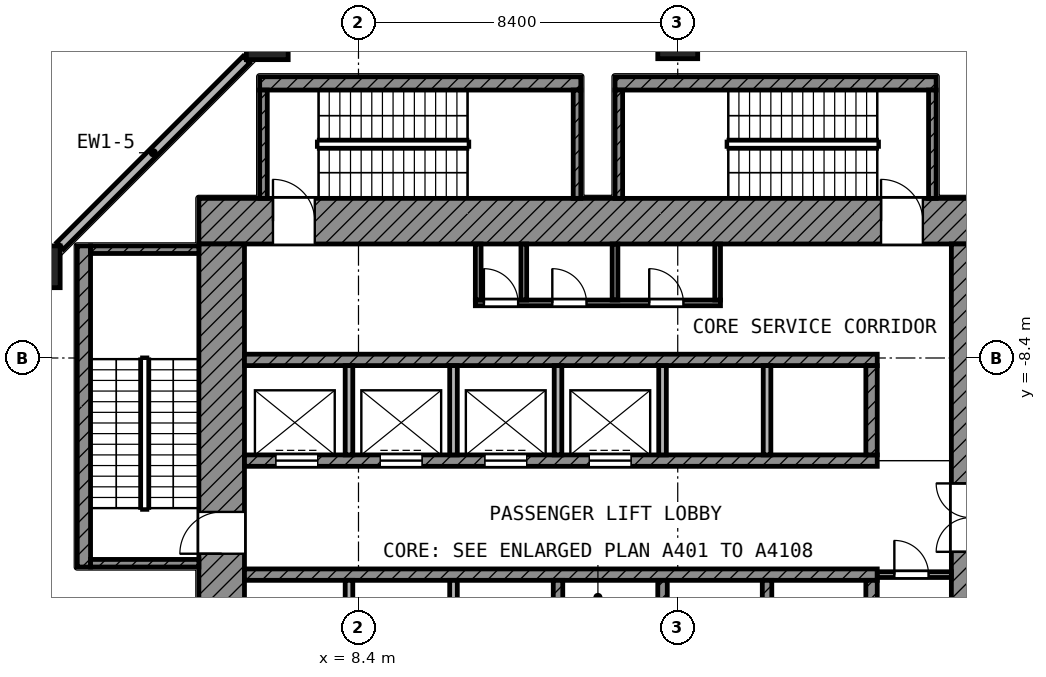
"""IFC4 building model, lengths in metres.
Left out: names, types, materials, properties, quantities, classifications, styles, units other than length and angle.
Written with IfcOpenShell. Run it as: python <this file> out.ifc"""

import sys

from ifc_helpers import new_model, si_unit, direction, frame, frame_2d, origin, origin_2d, place, context, subcontext, project, spatial, rectangle, extrude, element, fill, save


model = new_model("IFC4")
c1 = context("Model", 3, precision=1e-05, world=origin(), true_north=direction((0.0, 1.0)))
c2 = subcontext(c1, "Body", "Model", "MODEL_VIEW")
j1 = project(units=[si_unit("LENGTHUNIT", "METRE"), si_unit("PLANEANGLEUNIT", "RADIAN")], contexts=[c1])
p1 = place(None, origin())
s1 = spatial("IfcSite", under=j1, at=p1, CompositionType="ELEMENT")
p2 = place(p1, origin())
s2 = spatial("IfcBuilding", under=s1, at=p2, CompositionType="ELEMENT")
p3 = place(p2, frame((0.0, 0.0, 93.8)))
s3 = spatial("IfcBuildingStorey", under=s2, at=p3, CompositionType="ELEMENT", Elevation=93.8)
p4 = place(p3, frame((6.0, 0.0, 0.0), z_axis=(0.0, 0.0, 1.0), x_axis=(1.0, 0.0, 0.0)))
e1 = element("IfcColumn", 1, at=p4, inside=s3, PredefinedType="COLUMN", context=c2, shape_type="SweptSolid", body=[
    extrude(rectangle(XDim=1.1, YDim=1.1, at=origin_2d()), origin(), (0.0, 0.0, 1.0), 5.0),
])
p5 = place(p3, frame((16.8, 0.0, 0.0), z_axis=(0.0, 0.0, 1.0), x_axis=(1.0, 0.0, 0.0)))
e2 = element("IfcColumn", 2, at=p5, inside=s3, PredefinedType="COLUMN", context=c2, shape_type="SweptSolid", body=[
    extrude(rectangle(XDim=1.05, YDim=1.05, at=origin_2d()), origin(), (0.0, 0.0, 1.0), 5.0),
])
p6 = place(p3, frame((0.0, -6.0, 0.0), z_axis=(0.0, 0.0, 1.0), x_axis=(1.0, 0.0, 0.0)))
e3 = element("IfcColumn", 3, at=p6, inside=s3, PredefinedType="COLUMN", context=c2, shape_type="SweptSolid", body=[
    extrude(rectangle(XDim=1.1, YDim=1.1, at=origin_2d()), origin(), (0.0, 0.0, 1.0), 5.0),
])
p7 = place(p3, frame((5.45, -0.55, 0.0), z_axis=(0.0, 0.0, 1.0), x_axis=(-0.707106781187, -0.707106781187, 0.0)))
e4 = element("IfcWall", 4, at=p7, inside=s3, PredefinedType="SOLIDWALL", context=c2, shape_type="SweptSolid", body=[
    extrude(rectangle(XDim=6.929, YDim=0.25, at=frame_2d((3.465, 0.0))), origin(), (0.0, 0.0, 1.0), 3.0),
])
p8 = place(p3, frame((4.2, -4.8, 0.0), z_axis=(0.0, 0.0, 1.0), x_axis=(1.0, 0.0, 0.0)))
e5 = element("IfcWall", 5, at=p8, inside=s3, PredefinedType="SHEAR", context=c2, shape_type="SweptSolid", body=[
    extrude(rectangle(XDim=20.8, YDim=1.2, at=frame_2d((10.4, 0.0))), origin(), (0.0, 0.0, 1.0), 4.4),
])
p9 = place(p8, frame((1.95, 0.0, 0.0)))
e6 = element("IfcOpeningElement", 6, at=p9, cuts=e5, PredefinedType="OPENING", context=c2, shape_type="SweptSolid", body=[
    extrude(rectangle(XDim=1.1, YDim=2.1, at=frame_2d((0.55, 1.05))), frame((0.0, 0.61, 0.0), z_axis=(0.0, -1.0, 0.0), x_axis=(1.0, 0.0, 0.0)), (0.0, 0.0, 1.0), 1.22),
])
p10 = place(p8, frame((17.95, 0.0, 0.0)))
e7 = element("IfcOpeningElement", 7, at=p10, cuts=e5, PredefinedType="OPENING", context=c2, shape_type="SweptSolid", body=[
    extrude(rectangle(XDim=1.1, YDim=2.1, at=frame_2d((0.55, 1.05))), frame((0.0, 0.61, 0.0), z_axis=(0.0, -1.0, 0.0), x_axis=(1.0, 0.0, 0.0)), (0.0, 0.0, 1.0), 1.22),
])
p11 = place(p3, frame((4.8, -25.0, 0.0), z_axis=(0.0, 0.0, 1.0), x_axis=(0.0, 1.0, 0.0)))
e8 = element("IfcWall", 8, at=p11, inside=s3, PredefinedType="SHEAR", context=c2, shape_type="SweptSolid", body=[
    extrude(rectangle(XDim=19.6, YDim=1.2, at=frame_2d((9.8, 0.0))), origin(), (0.0, 0.0, 1.0), 4.4),
])
p12 = place(p11, frame((11.45, 0.0, 0.0)))
e9 = element("IfcOpeningElement", 9, at=p12, cuts=e8, PredefinedType="OPENING", context=c2, shape_type="SweptSolid", body=[
    extrude(rectangle(XDim=1.1, YDim=2.1, at=frame_2d((0.55, 1.05))), frame((0.0, 0.61, 0.0), z_axis=(0.0, -1.0, 0.0), x_axis=(1.0, 0.0, 0.0)), (0.0, 0.0, 1.0), 1.22),
])
p13 = place(p11, frame((2.15, 0.0, 0.0)))
e10 = element("IfcOpeningElement", 10, at=p13, cuts=e8, PredefinedType="OPENING", context=c2, shape_type="SweptSolid", body=[
    extrude(rectangle(XDim=1.1, YDim=2.1, at=frame_2d((0.55, 1.05))), frame((0.0, 0.61, 0.0), z_axis=(0.0, -1.0, 0.0), x_axis=(1.0, 0.0, 0.0)), (0.0, 0.0, 1.0), 1.22),
])
p14 = place(p3, frame((24.5, -24.0, 0.0), z_axis=(0.0, 0.0, 1.0), x_axis=(0.0, 1.0, 0.0)))
e11 = element("IfcWall", 11, at=p14, inside=s3, PredefinedType="SHEAR", context=c2, shape_type="SweptSolid", body=[
    extrude(rectangle(XDim=18.6, YDim=1.0, at=frame_2d((9.3, 0.0))), origin(), (0.0, 0.0, 1.0), 4.4),
])
p15 = place(p14, frame((10.5, 0.0, 0.0)))
e12 = element("IfcOpeningElement", 12, at=p15, cuts=e11, PredefinedType="OPENING", context=c2, shape_type="SweptSolid", body=[
    extrude(rectangle(XDim=1.8, YDim=2.1, at=frame_2d((0.9, 1.05))), frame((0.0, 0.51, 0.0), z_axis=(0.0, -1.0, 0.0), x_axis=(1.0, 0.0, 0.0)), (0.0, 0.0, 1.0), 1.02),
])
p16 = place(p3, frame((5.4, -8.45, 0.0), z_axis=(0.0, 0.0, 1.0), x_axis=(1.0, 0.0, 0.0)))
e13 = element("IfcWall", 13, at=p16, inside=s3, PredefinedType="SHEAR", context=c2, shape_type="SweptSolid", body=[
    extrude(rectangle(XDim=16.65, YDim=0.3, at=frame_2d((8.325, 0.0))), origin(), (0.0, 0.0, 1.0), 4.4),
])
p17 = place(p3, frame((5.4, -11.1, 0.0), z_axis=(0.0, 0.0, 1.0), x_axis=(1.0, 0.0, 0.0)))
e14 = element("IfcWall", 14, at=p17, inside=s3, PredefinedType="SHEAR", context=c2, shape_type="SweptSolid", body=[
    extrude(rectangle(XDim=16.65, YDim=0.3, at=frame_2d((8.325, 0.0))), origin(), (0.0, 0.0, 1.0), 4.4),
])
p18 = place(p17, frame((0.825, 0.0, 0.0)))
e15 = element("IfcOpeningElement", 15, at=p18, cuts=e14, PredefinedType="OPENING", context=c2, shape_type="SweptSolid", body=[
    extrude(rectangle(XDim=1.1, YDim=2.1, at=frame_2d((0.55, 1.05))), frame((0.0, 0.16, 0.0), z_axis=(0.0, -1.0, 0.0), x_axis=(1.0, 0.0, 0.0)), (0.0, 0.0, 1.0), 0.32),
])
p19 = place(p17, frame((3.575, 0.0, 0.0)))
e16 = element("IfcOpeningElement", 16, at=p19, cuts=e14, PredefinedType="OPENING", context=c2, shape_type="SweptSolid", body=[
    extrude(rectangle(XDim=1.1, YDim=2.1, at=frame_2d((0.55, 1.05))), frame((0.0, 0.16, 0.0), z_axis=(0.0, -1.0, 0.0), x_axis=(1.0, 0.0, 0.0)), (0.0, 0.0, 1.0), 0.32),
])
p20 = place(p17, frame((6.325, 0.0, 0.0)))
e17 = element("IfcOpeningElement", 17, at=p20, cuts=e14, PredefinedType="OPENING", context=c2, shape_type="SweptSolid", body=[
    extrude(rectangle(XDim=1.1, YDim=2.1, at=frame_2d((0.55, 1.05))), frame((0.0, 0.16, 0.0), z_axis=(0.0, -1.0, 0.0), x_axis=(1.0, 0.0, 0.0)), (0.0, 0.0, 1.0), 0.32),
])
p21 = place(p17, frame((9.075, 0.0, 0.0)))
e18 = element("IfcOpeningElement", 18, at=p21, cuts=e14, PredefinedType="OPENING", context=c2, shape_type="SweptSolid", body=[
    extrude(rectangle(XDim=1.1, YDim=2.1, at=frame_2d((0.55, 1.05))), frame((0.0, 0.16, 0.0), z_axis=(0.0, -1.0, 0.0), x_axis=(1.0, 0.0, 0.0)), (0.0, 0.0, 1.0), 0.32),
])
p22 = place(p3, frame((5.4, -14.1, 0.0), z_axis=(0.0, 0.0, 1.0), x_axis=(1.0, 0.0, 0.0)))
e19 = element("IfcWall", 19, at=p22, inside=s3, PredefinedType="SHEAR", context=c2, shape_type="SweptSolid", body=[
    extrude(rectangle(XDim=16.65, YDim=0.3, at=frame_2d((8.325, 0.0))), origin(), (0.0, 0.0, 1.0), 4.4),
])
p23 = place(p3, frame((21.9, -10.95, 0.0), z_axis=(0.0, 0.0, 1.0), x_axis=(0.0, 1.0, 0.0)))
e20 = element("IfcWall", 20, at=p23, inside=s3, PredefinedType="SHEAR", context=c2, shape_type="SweptSolid", body=[
    extrude(rectangle(XDim=2.35, YDim=0.3, at=frame_2d((1.175, 0.0))), origin(), (0.0, 0.0, 1.0), 4.4),
])
p24 = place(p3, frame((21.9, -16.6, 0.0), z_axis=(0.0, 0.0, 1.0), x_axis=(0.0, 1.0, 0.0)))
e21 = element("IfcWall", 21, at=p24, inside=s3, PredefinedType="SHEAR", context=c2, shape_type="SweptSolid", body=[
    extrude(rectangle(XDim=2.35, YDim=0.3, at=frame_2d((1.175, 0.0))), origin(), (0.0, 0.0, 1.0), 4.4),
])
for number, where, z_axis, x_axis in (
    (22, (8.15, -10.95, 0.0), (0.0, 0.0, 1.0), (0.0, 1.0, 0.0)),
    (23, (10.9, -10.95, 0.0), (0.0, 0.0, 1.0), (0.0, 1.0, 0.0)),
    (24, (13.65, -10.95, 0.0), (0.0, 0.0, 1.0), (0.0, 1.0, 0.0)),
    (25, (16.4, -10.95, 0.0), (0.0, 0.0, 1.0), (0.0, 1.0, 0.0)),
    (26, (19.15, -10.95, 0.0), (0.0, 0.0, 1.0), (0.0, 1.0, 0.0)),
):
    element("IfcWall", number, at=place(p3, frame(where, z_axis=z_axis, x_axis=x_axis)), inside=s3, PredefinedType="PARTITIONING", context=c2, shape_type="SweptSolid", body=[
        extrude(rectangle(XDim=2.35, YDim=0.2, at=frame_2d((1.175, 0.0))), origin(), (0.0, 0.0, 1.0), 4.4),
    ])
for number, where, z_axis, x_axis in (
    (27, (8.15, -16.6, 0.0), (0.0, 0.0, 1.0), (0.0, 1.0, 0.0)),
    (28, (10.9, -16.6, 0.0), (0.0, 0.0, 1.0), (0.0, 1.0, 0.0)),
):
    element("IfcWall", number, at=place(p3, frame(where, z_axis=z_axis, x_axis=x_axis)), inside=s3, PredefinedType="PARTITIONING", context=c2, shape_type="SweptSolid", body=[
        extrude(rectangle(XDim=2.35, YDim=0.2, at=frame_2d((1.175, 0.0))), origin(), (0.0, 0.0, 1.0), 4.4),
    ])
for number, where, z_axis, x_axis in (
    (29, (13.65, -16.6, 0.0), (0.0, 0.0, 1.0), (0.0, 1.0, 0.0)),
    (30, (16.4, -16.6, 0.0), (0.0, 0.0, 1.0), (0.0, 1.0, 0.0)),
    (31, (19.15, -16.6, 0.0), (0.0, 0.0, 1.0), (0.0, 1.0, 0.0)),
):
    element("IfcWall", number, at=place(p3, frame(where, z_axis=z_axis, x_axis=x_axis)), inside=s3, PredefinedType="SHEAR", context=c2, shape_type="SweptSolid", body=[
        extrude(rectangle(XDim=2.35, YDim=0.25, at=frame_2d((1.175, 0.0))), origin(), (0.0, 0.0, 1.0), 4.4),
    ])
p25 = place(p3, frame((22.05, -14.1, 0.0), z_axis=(0.0, 0.0, 1.0), x_axis=(1.0, 0.0, 0.0)))
e32 = element("IfcWall", 32, at=p25, inside=s3, PredefinedType="PARTITIONING", context=c2, shape_type="SweptSolid", body=[
    extrude(rectangle(XDim=1.95, YDim=0.15, at=frame_2d((0.975, 0.0))), origin(), (0.0, 0.0, 1.0), 4.4),
])
p26 = place(p25, frame((0.45, 0.0, 0.0)))
e33 = element("IfcOpeningElement", 33, at=p26, cuts=e32, PredefinedType="OPENING", context=c2, shape_type="SweptSolid", body=[
    extrude(rectangle(XDim=0.9, YDim=2.1, at=frame_2d((0.45, 1.05))), frame((0.0, 0.085, 0.0), z_axis=(0.0, -1.0, 0.0), x_axis=(1.0, 0.0, 0.0)), (0.0, 0.0, 1.0), 0.17),
])
p27 = place(p3, frame((11.475, -6.95, 0.0), z_axis=(0.0, 0.0, 1.0), x_axis=(1.0, 0.0, 0.0)))
e34 = element("IfcWall", 34, at=p27, inside=s3, PredefinedType="PARTITIONING", context=c2, shape_type="SweptSolid", body=[
    extrude(rectangle(XDim=6.45, YDim=0.15, at=frame_2d((3.225, 0.0))), origin(), (0.0, 0.0, 1.0), 4.4),
])
p28 = place(p27, frame((0.225, 0.0, 0.0)))
e35 = element("IfcOpeningElement", 35, at=p28, cuts=e34, PredefinedType="OPENING", context=c2, shape_type="SweptSolid", body=[
    extrude(rectangle(XDim=0.9, YDim=2.1, at=frame_2d((0.45, 1.05))), frame((0.0, 0.085, 0.0), z_axis=(0.0, -1.0, 0.0), x_axis=(1.0, 0.0, 0.0)), (0.0, 0.0, 1.0), 0.17),
])
p29 = place(p27, frame((2.025, 0.0, 0.0)))
e36 = element("IfcOpeningElement", 36, at=p29, cuts=e34, PredefinedType="OPENING", context=c2, shape_type="SweptSolid", body=[
    extrude(rectangle(XDim=0.9, YDim=2.1, at=frame_2d((0.45, 1.05))), frame((0.0, 0.085, 0.0), z_axis=(0.0, -1.0, 0.0), x_axis=(1.0, 0.0, 0.0)), (0.0, 0.0, 1.0), 0.17),
])
p30 = place(p27, frame((4.575, 0.0, 0.0)))
e37 = element("IfcOpeningElement", 37, at=p30, cuts=e34, PredefinedType="OPENING", context=c2, shape_type="SweptSolid", body=[
    extrude(rectangle(XDim=0.9, YDim=2.1, at=frame_2d((0.45, 1.05))), frame((0.0, 0.085, 0.0), z_axis=(0.0, -1.0, 0.0), x_axis=(1.0, 0.0, 0.0)), (0.0, 0.0, 1.0), 0.17),
])
for number, where, z_axis, x_axis in (
    (38, (11.55, -6.875, 0.0), (0.0, 0.0, 1.0), (0.0, 1.0, 0.0)),
    (39, (12.75, -6.875, 0.0), (0.0, 0.0, 1.0), (0.0, 1.0, 0.0)),
    (40, (15.15, -6.875, 0.0), (0.0, 0.0, 1.0), (0.0, 1.0, 0.0)),
    (41, (17.85, -6.875, 0.0), (0.0, 0.0, 1.0), (0.0, 1.0, 0.0)),
):
    element("IfcWall", number, at=place(p3, frame(where, z_axis=z_axis, x_axis=x_axis)), inside=s3, PredefinedType="PARTITIONING", context=c2, shape_type="SweptSolid", body=[
        extrude(rectangle(XDim=1.475, YDim=0.15, at=frame_2d((0.738, 0.0))), origin(), (0.0, 0.0, 1.0), 4.4),
    ])
p31 = place(p3, frame((1.175, -13.9, 0.0), z_axis=(0.0, 0.0, 1.0), x_axis=(0.0, 1.0, 0.0)))
e42 = element("IfcWall", 42, at=p31, inside=s3, PredefinedType="SHEAR", context=c2, shape_type="SweptSolid", body=[
    extrude(rectangle(XDim=8.45, YDim=0.35, at=frame_2d((4.225, 0.0))), origin(), (0.0, 0.0, 1.0), 4.4),
])
for number, where, z_axis, x_axis in (
    (43, (1.35, -5.55, 0.0), (0.0, 0.0, 1.0), (1.0, 0.0, 0.0)),
    (44, (1.35, -13.8, 0.0), (0.0, 0.0, 1.0), (1.0, 0.0, 0.0)),
):
    element("IfcWall", number, at=place(p3, frame(where, z_axis=z_axis, x_axis=x_axis)), inside=s3, PredefinedType="SHEAR", context=c2, shape_type="SweptSolid", body=[
        extrude(rectangle(XDim=2.85, YDim=0.2, at=frame_2d((1.425, 0.0))), origin(), (0.0, 0.0, 1.0), 4.4),
    ])
p32 = place(p3, frame((5.8, -1.175, 0.0), z_axis=(0.0, 0.0, 1.0), x_axis=(1.0, 0.0, 0.0)))
e45 = element("IfcWall", 45, at=p32, inside=s3, PredefinedType="SHEAR", context=c2, shape_type="SweptSolid", body=[
    extrude(rectangle(XDim=8.45, YDim=0.35, at=frame_2d((4.225, 0.0))), origin(), (0.0, 0.0, 1.0), 4.4),
])
for number, where, z_axis, x_axis in (
    (46, (5.9, -4.2, 0.0), (0.0, 0.0, 1.0), (0.0, 1.0, 0.0)),
    (47, (14.15, -4.2, 0.0), (0.0, 0.0, 1.0), (0.0, 1.0, 0.0)),
):
    element("IfcWall", number, at=place(p3, frame(where, z_axis=z_axis, x_axis=x_axis)), inside=s3, PredefinedType="SHEAR", context=c2, shape_type="SweptSolid", body=[
        extrude(rectangle(XDim=2.85, YDim=0.2, at=frame_2d((1.425, 0.0))), origin(), (0.0, 0.0, 1.0), 4.4),
    ])
p33 = place(p3, frame((15.15, -1.175, 0.0), z_axis=(0.0, 0.0, 1.0), x_axis=(1.0, 0.0, 0.0)))
e48 = element("IfcWall", 48, at=p33, inside=s3, PredefinedType="SHEAR", context=c2, shape_type="SweptSolid", body=[
    extrude(rectangle(XDim=8.45, YDim=0.35, at=frame_2d((4.225, 0.0))), origin(), (0.0, 0.0, 1.0), 4.4),
])
for number, where, z_axis, x_axis in (
    (49, (15.25, -4.2, 0.0), (0.0, 0.0, 1.0), (0.0, 1.0, 0.0)),
    (50, (23.5, -4.2, 0.0), (0.0, 0.0, 1.0), (0.0, 1.0, 0.0)),
):
    element("IfcWall", number, at=place(p3, frame(where, z_axis=z_axis, x_axis=x_axis)), inside=s3, PredefinedType="SHEAR", context=c2, shape_type="SweptSolid", body=[
        extrude(rectangle(XDim=2.85, YDim=0.2, at=frame_2d((1.425, 0.0))), origin(), (0.0, 0.0, 1.0), 4.4),
    ])
p34 = place(p18, origin())
e51 = element("IfcDoor", 51, at=p34, inside=s3, OperationType="DOUBLE_DOOR_SLIDING", PredefinedType="DOOR", context=c2, shape_type="SweptSolid", body=[
    extrude(rectangle(XDim=1.1, YDim=2.1, at=frame_2d((0.55, 1.05))), frame((0.0, 0.025, 0.0), z_axis=(0.0, -1.0, 0.0), x_axis=(1.0, 0.0, 0.0)), (0.0, 0.0, 1.0), 0.05),
])
fill(e15, e51)
p35 = place(p19, origin())
e52 = element("IfcDoor", 52, at=p35, inside=s3, OperationType="DOUBLE_DOOR_SLIDING", PredefinedType="DOOR", context=c2, shape_type="SweptSolid", body=[
    extrude(rectangle(XDim=1.1, YDim=2.1, at=frame_2d((0.55, 1.05))), frame((0.0, 0.025, 0.0), z_axis=(0.0, -1.0, 0.0), x_axis=(1.0, 0.0, 0.0)), (0.0, 0.0, 1.0), 0.05),
])
fill(e16, e52)
p36 = place(p20, origin())
e53 = element("IfcDoor", 53, at=p36, inside=s3, OperationType="DOUBLE_DOOR_SLIDING", PredefinedType="DOOR", context=c2, shape_type="SweptSolid", body=[
    extrude(rectangle(XDim=1.1, YDim=2.1, at=frame_2d((0.55, 1.05))), frame((0.0, 0.025, 0.0), z_axis=(0.0, -1.0, 0.0), x_axis=(1.0, 0.0, 0.0)), (0.0, 0.0, 1.0), 0.05),
])
fill(e17, e53)
p37 = place(p21, origin())
e54 = element("IfcDoor", 54, at=p37, inside=s3, OperationType="DOUBLE_DOOR_SLIDING", PredefinedType="DOOR", context=c2, shape_type="SweptSolid", body=[
    extrude(rectangle(XDim=1.1, YDim=2.1, at=frame_2d((0.55, 1.05))), frame((0.0, 0.025, 0.0), z_axis=(0.0, -1.0, 0.0), x_axis=(1.0, 0.0, 0.0)), (0.0, 0.0, 1.0), 0.05),
])
fill(e18, e54)
p38 = place(p12, origin())
e55 = element("IfcDoor", 55, at=p38, inside=s3, OperationType="SINGLE_SWING_LEFT", PredefinedType="DOOR", context=c2, shape_type="SweptSolid", body=[
    extrude(rectangle(XDim=1.1, YDim=2.1, at=frame_2d((0.55, 1.05))), frame((0.0, 0.025, 0.0), z_axis=(0.0, -1.0, 0.0), x_axis=(1.0, 0.0, 0.0)), (0.0, 0.0, 1.0), 0.05),
])
fill(e9, e55)
p39 = place(p9, origin())
e56 = element("IfcDoor", 56, at=p39, inside=s3, OperationType="SINGLE_SWING_LEFT", PredefinedType="DOOR", context=c2, shape_type="SweptSolid", body=[
    extrude(rectangle(XDim=1.1, YDim=2.1, at=frame_2d((0.55, 1.05))), frame((0.0, 0.025, 0.0), z_axis=(0.0, -1.0, 0.0), x_axis=(1.0, 0.0, 0.0)), (0.0, 0.0, 1.0), 0.05),
])
fill(e6, e56)
p40 = place(p10, origin())
e57 = element("IfcDoor", 57, at=p40, inside=s3, OperationType="SINGLE_SWING_LEFT", PredefinedType="DOOR", context=c2, shape_type="SweptSolid", body=[
    extrude(rectangle(XDim=1.1, YDim=2.1, at=frame_2d((0.55, 1.05))), frame((0.0, 0.025, 0.0), z_axis=(0.0, -1.0, 0.0), x_axis=(1.0, 0.0, 0.0)), (0.0, 0.0, 1.0), 0.05),
])
fill(e7, e57)
p41 = place(p28, origin())
e58 = element("IfcDoor", 58, at=p41, inside=s3, OperationType="SINGLE_SWING_LEFT", PredefinedType="DOOR", context=c2, shape_type="SweptSolid", body=[
    extrude(rectangle(XDim=0.9, YDim=2.1, at=frame_2d((0.45, 1.05))), frame((0.0, 0.025, 0.0), z_axis=(0.0, -1.0, 0.0), x_axis=(1.0, 0.0, 0.0)), (0.0, 0.0, 1.0), 0.05),
])
fill(e35, e58)
p42 = place(p29, origin())
e59 = element("IfcDoor", 59, at=p42, inside=s3, OperationType="SINGLE_SWING_LEFT", PredefinedType="DOOR", context=c2, shape_type="SweptSolid", body=[
    extrude(rectangle(XDim=0.9, YDim=2.1, at=frame_2d((0.45, 1.05))), frame((0.0, 0.025, 0.0), z_axis=(0.0, -1.0, 0.0), x_axis=(1.0, 0.0, 0.0)), (0.0, 0.0, 1.0), 0.05),
])
fill(e36, e59)
p43 = place(p30, origin())
e60 = element("IfcDoor", 60, at=p43, inside=s3, OperationType="SINGLE_SWING_LEFT", PredefinedType="DOOR", context=c2, shape_type="SweptSolid", body=[
    extrude(rectangle(XDim=0.9, YDim=2.1, at=frame_2d((0.45, 1.05))), frame((0.0, 0.025, 0.0), z_axis=(0.0, -1.0, 0.0), x_axis=(1.0, 0.0, 0.0)), (0.0, 0.0, 1.0), 0.05),
])
fill(e37, e60)
p44 = place(p26, origin())
e61 = element("IfcDoor", 61, at=p44, inside=s3, OperationType="SINGLE_SWING_LEFT", PredefinedType="DOOR", context=c2, shape_type="SweptSolid", body=[
    extrude(rectangle(XDim=0.9, YDim=2.1, at=frame_2d((0.45, 1.05))), frame((0.0, 0.025, 0.0), z_axis=(0.0, -1.0, 0.0), x_axis=(1.0, 0.0, 0.0)), (0.0, 0.0, 1.0), 0.05),
])
fill(e33, e61)
save(model, sys.argv[1])
